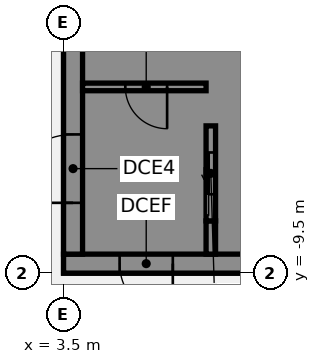
"""IFC4 building model, lengths in metres.
Left out: names, types, materials, properties, quantities, classifications, styles, units other than length and angle.
Written with IfcOpenShell. Run it as: python <this file> out.ifc"""

import sys

from ifc_helpers import new_model, si_unit, direction, frame, frame_2d, origin, place, context, subcontext, project, spatial, polyline, rectangle, outline, extrude, element, fill, save


model = new_model("IFC4")
c1 = context("Model", 3, precision=1e-05, world=origin(), true_north=direction((0.0, 1.0)))
c2 = subcontext(c1, "Body", "Model", "MODEL_VIEW")
j1 = project(units=[si_unit("LENGTHUNIT", "METRE"), si_unit("PLANEANGLEUNIT", "RADIAN")], contexts=[c1])
p1 = place(None, origin())
s1 = spatial("IfcSite", under=j1, at=p1, CompositionType="ELEMENT")
p2 = place(p1, origin())
s2 = spatial("IfcBuilding", under=s1, at=p2, CompositionType="ELEMENT")
p3 = place(p2, frame((0.0, 0.0, 313.4)))
s3 = spatial("IfcBuildingStorey", under=s2, at=p3, CompositionType="ELEMENT", Elevation=313.4)
p4 = place(p3, frame((16.5, -9.25, 0.0), z_axis=(0.0, 0.0, 1.0), x_axis=(-1.0, 0.0, 0.0)))
e1 = element("IfcWall", 1, at=p4, inside=s3, PredefinedType="SHEAR", context=c2, shape_type="SweptSolid", body=[
    extrude(rectangle(XDim=13.0, YDim=0.5, at=frame_2d((6.5, 0.0))), origin(), (0.0, 0.0, 1.0), 3.82),
])
p5 = place(p4, frame((4.15, 0.0, 0.0)))
e2 = element("IfcOpeningElement", 2, at=p5, cuts=e1, PredefinedType="OPENING", context=c2, shape_type="SweptSolid", body=[
    extrude(rectangle(XDim=1.4, YDim=2.1, at=frame_2d((0.7, 1.05))), frame((0.0, 0.26, 0.0), z_axis=(0.0, -1.0, 0.0), x_axis=(1.0, 0.0, 0.0)), (0.0, 0.0, 1.0), 0.52),
])
p6 = place(p4, frame((10.125, 0.0, 0.0)))
e3 = element("IfcOpeningElement", 3, at=p6, cuts=e1, PredefinedType="OPENING", context=c2, shape_type="SweptSolid", body=[
    extrude(rectangle(XDim=1.4, YDim=2.1, at=frame_2d((0.7, 1.05))), frame((0.0, 0.26, 0.0), z_axis=(0.0, -1.0, 0.0), x_axis=(1.0, 0.0, 0.0)), (0.0, 0.0, 1.0), 0.52),
])
p7 = place(p3, origin())
e4 = element("IfcWall", 4, at=p7, inside=s3, PredefinedType="SHEAR", context=c2, shape_type="SweptSolid", body=[
    extrude(outline(polyline([(9.8, -5.625), (9.8, -5.375), (7.5, -5.375), (7.5, 8.125), (9.8, 8.125), (9.8, 9.0), (7.5, 9.0), (7.25, 9.0), (7.25, -5.625), (7.5, -5.625), (9.8, -5.625)])), origin(), (0.0, 0.0, 1.0), 3.82),
])
p8 = place(p3, origin())
e5 = element("IfcWall", 5, at=p8, inside=s3, PredefinedType="SHEAR", context=c2, shape_type="SweptSolid", body=[
    extrude(outline(polyline([(7.5, -8.125), (7.5, -9.0), (9.8, -9.0), (9.8, -8.125), (9.8, -5.625), (9.55, -5.625), (9.55, -8.125), (7.5, -8.125)])), origin(), (0.0, 0.0, 1.0), 3.82),
])
p9 = place(p3, frame((7.375, -9.0, 0.0), z_axis=(0.0, 0.0, 1.0), x_axis=(0.0, 1.0, 0.0)))
e6 = element("IfcWall", 6, at=p9, inside=s3, PredefinedType="SHEAR", context=c2, shape_type="SweptSolid", body=[
    extrude(rectangle(XDim=0.875, YDim=0.25, at=frame_2d((0.438, 0.0))), origin(), (0.0, 0.0, 1.0), 3.82),
])
p10 = place(p3, frame((7.375, -8.125, 0.0), z_axis=(0.0, 0.0, 1.0), x_axis=(0.0, 1.0, 0.0)))
e7 = element("IfcWall", 7, at=p10, inside=s3, PredefinedType="SHEAR", context=c2, shape_type="SweptSolid", body=[
    extrude(rectangle(XDim=2.5, YDim=0.25, at=frame_2d((1.25, 0.0))), origin(), (0.0, 0.0, 1.0), 3.82),
])
p11 = place(p10, frame((0.7, 0.0, 0.0)))
e8 = element("IfcOpeningElement", 8, at=p11, cuts=e7, PredefinedType="OPENING", context=c2, shape_type="SweptSolid", body=[
    extrude(rectangle(XDim=1.1, YDim=2.1, at=frame_2d((0.55, 1.05))), frame((0.0, 0.135, 0.0), z_axis=(0.0, -1.0, 0.0), x_axis=(1.0, 0.0, 0.0)), (0.0, 0.0, 1.0), 0.27),
])
p12 = place(p3, frame((3.75, -9.0, 0.0), z_axis=(0.0, 0.0, 1.0), x_axis=(0.0, 1.0, 0.0)))
e9 = element("IfcWall", 9, at=p12, inside=s3, PredefinedType="SHEAR", context=c2, shape_type="SweptSolid", body=[
    extrude(rectangle(XDim=18.0, YDim=0.5, at=frame_2d((9.0, 0.0))), origin(), (0.0, 0.0, 1.0), 3.82),
])
p13 = place(p12, frame((1.35, 0.0, 0.0)))
e10 = element("IfcOpeningElement", 10, at=p13, cuts=e9, PredefinedType="OPENING", context=c2, shape_type="SweptSolid", body=[
    extrude(rectangle(XDim=1.8, YDim=2.1, at=frame_2d((0.9, 1.05))), frame((0.0, 0.26, 0.0), z_axis=(0.0, -1.0, 0.0), x_axis=(1.0, 0.0, 0.0)), (0.0, 0.0, 1.0), 0.52),
])
p14 = place(p12, frame((13.9, 0.0, 0.0)))
e11 = element("IfcOpeningElement", 11, at=p14, cuts=e9, PredefinedType="OPENING", context=c2, shape_type="SweptSolid", body=[
    extrude(rectangle(XDim=1.0, YDim=2.1, at=frame_2d((0.5, 1.05))), frame((0.0, 0.26, 0.0), z_axis=(0.0, -1.0, 0.0), x_axis=(1.0, 0.0, 0.0)), (0.0, 0.0, 1.0), 0.52),
])
p15 = place(p3, frame((7.25, -4.6, 0.0), z_axis=(0.0, 0.0, 1.0), x_axis=(-1.0, 0.0, 0.0)))
e12 = element("IfcWall", 12, at=p15, inside=s3, PredefinedType="SHEAR", context=c2, shape_type="SweptSolid", body=[
    extrude(rectangle(XDim=3.25, YDim=0.2, at=frame_2d((1.625, 0.0))), origin(), (0.0, 0.0, 1.0), 3.82),
])
p16 = place(p15, frame((1.025, 0.0, 0.0)))
e13 = element("IfcOpeningElement", 13, at=p16, cuts=e12, PredefinedType="OPENING", context=c2, shape_type="SweptSolid", body=[
    extrude(rectangle(XDim=1.1, YDim=2.1, at=frame_2d((0.55, 1.05))), frame((0.0, 0.11, 0.0), z_axis=(0.0, -1.0, 0.0), x_axis=(1.0, 0.0, 0.0)), (0.0, 0.0, 1.0), 0.22),
])
p17 = place(p6, origin())
e14 = element("IfcDoor", 14, at=p17, inside=s3, OperationType="SINGLE_SWING_LEFT", PredefinedType="DOOR", context=c2, shape_type="SweptSolid", body=[
    extrude(rectangle(XDim=1.4, YDim=2.1, at=frame_2d((0.7, 1.05))), frame((0.0, 0.025, 0.0), z_axis=(0.0, -1.0, 0.0), x_axis=(1.0, 0.0, 0.0)), (0.0, 0.0, 1.0), 0.05),
])
fill(e3, e14)
p18 = place(p13, origin())
e15 = element("IfcDoor", 15, at=p18, inside=s3, OperationType="SINGLE_SWING_LEFT", PredefinedType="DOOR", context=c2, shape_type="SweptSolid", body=[
    extrude(rectangle(XDim=1.8, YDim=2.1, at=frame_2d((0.9, 1.05))), frame((0.0, 0.025, 0.0), z_axis=(0.0, -1.0, 0.0), x_axis=(1.0, 0.0, 0.0)), (0.0, 0.0, 1.0), 0.05),
])
fill(e10, e15)
p19 = place(p16, origin())
e16 = element("IfcDoor", 16, at=p19, inside=s3, OperationType="SINGLE_SWING_LEFT", PredefinedType="DOOR", context=c2, shape_type="SweptSolid", body=[
    extrude(rectangle(XDim=1.1, YDim=2.1, at=frame_2d((0.55, 1.05))), frame((0.0, 0.025, 0.0), z_axis=(0.0, -1.0, 0.0), x_axis=(1.0, 0.0, 0.0)), (0.0, 0.0, 1.0), 0.05),
])
fill(e13, e16)
p20 = place(p11, origin())
e17 = element("IfcDoor", 17, at=p20, inside=s3, OperationType="SLIDING_TO_LEFT", PredefinedType="DOOR", context=c2, shape_type="SweptSolid", body=[
    extrude(rectangle(XDim=1.1, YDim=2.1, at=frame_2d((0.55, 1.05))), frame((0.0, 0.025, 0.0), z_axis=(0.0, -1.0, 0.0), x_axis=(1.0, 0.0, 0.0)), (0.0, 0.0, 1.0), 0.05),
])
fill(e8, e17)
save(model, sys.argv[1])
